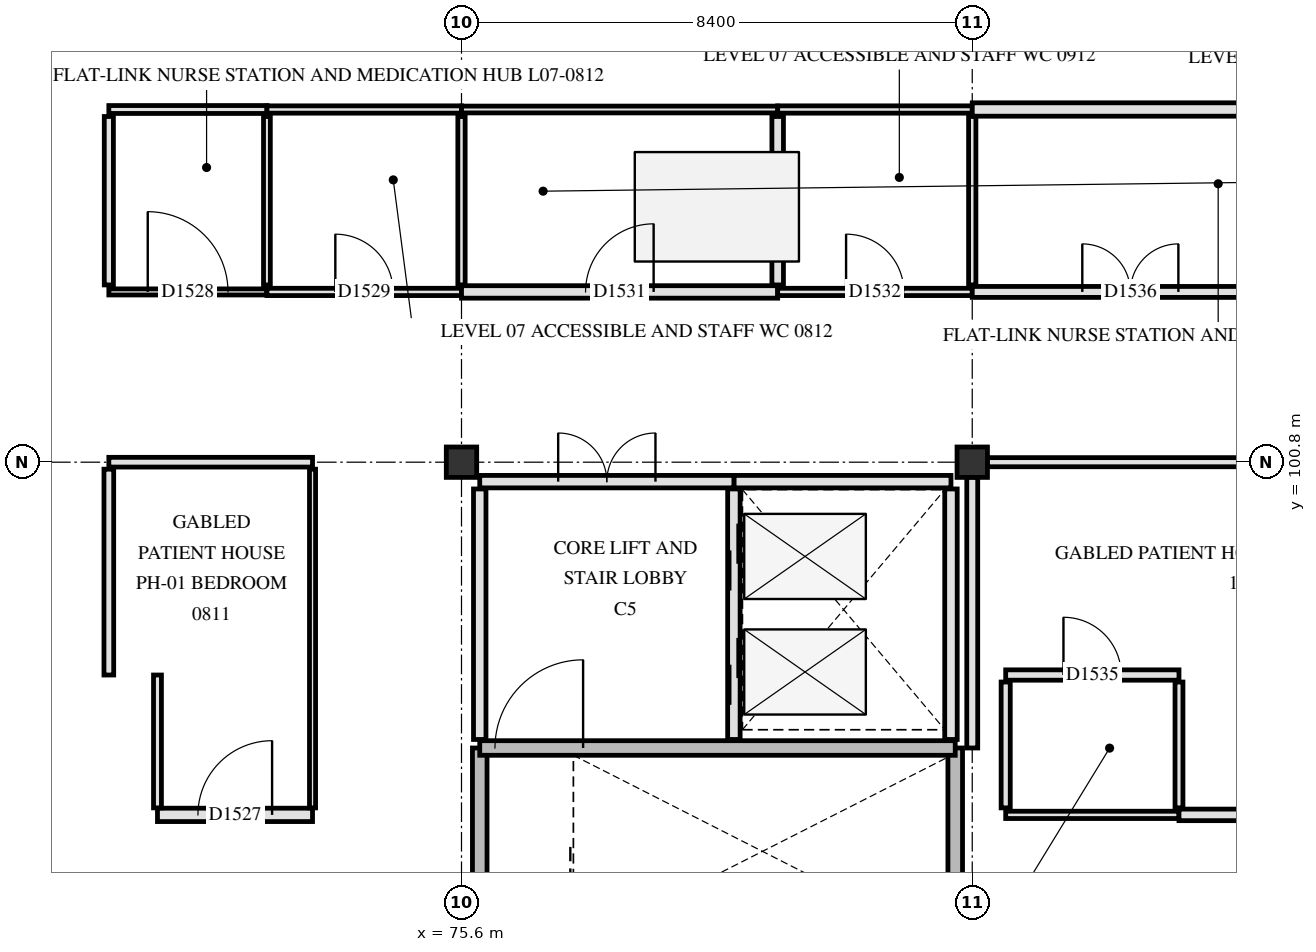
"""IFC4 building model, lengths in metres.
Left out: names, types, materials, properties, quantities, classifications, styles, units other than length and angle.
Written with IfcOpenShell. Run it as: python <this file> out.ifc"""

import sys

from ifc_helpers import new_model, si_unit, direction, frame, frame_2d, origin, origin_2d, place, context, subcontext, project, spatial, rectangle, extrude, element, fill, save


model = new_model("IFC4")
c1 = context("Model", 3, precision=1e-05, world=origin(), true_north=direction((0.0, 1.0)))
c2 = subcontext(c1, "Body", "Model", "MODEL_VIEW")
j1 = project(units=[si_unit("LENGTHUNIT", "METRE"), si_unit("PLANEANGLEUNIT", "RADIAN")], contexts=[c1])
p1 = place(None, origin())
s1 = spatial("IfcSite", under=j1, at=p1, CompositionType="ELEMENT")
p2 = place(p1, origin())
s2 = spatial("IfcBuilding", under=s1, at=p2, CompositionType="ELEMENT")
p3 = place(p2, frame((0.0, 0.0, 30.3)))
s3 = spatial("IfcBuildingStorey", under=s2, at=p3, CompositionType="ELEMENT", Elevation=30.3)
for number, where, z_axis, x_axis in (
    (1, (75.6, 100.8, 0.0), (0.0, 0.0, 1.0), (1.0, 0.0, 0.0)),
    (2, (84.0, 100.8, 0.0), (0.0, 0.0, 1.0), (1.0, 0.0, 0.0)),
):
    element("IfcColumn", number, at=place(p3, frame(where, z_axis=z_axis, x_axis=x_axis)), inside=s3, PredefinedType="COLUMN", context=c2, shape_type="SweptSolid", body=[
        extrude(rectangle(XDim=0.5, YDim=0.5, at=origin_2d()), origin(), (0.0, 0.0, 1.0), 3.9),
    ])
for number, where, z_axis, x_axis in (
    (3, (75.9, 92.78, 0.0), (0.0, 0.0, 1.0), (0.0, 1.0, 0.0)),
    (4, (83.72, 92.78, 0.0), (0.0, 0.0, 1.0), (0.0, 1.0, 0.0)),
):
    element("IfcWall", number, at=place(p3, frame(where, z_axis=z_axis, x_axis=x_axis)), inside=s3, PredefinedType="SHEAR", context=c2, shape_type="SweptSolid", body=[
        extrude(rectangle(XDim=3.32, YDim=0.24, at=frame_2d((1.66, 0.0))), origin(), (0.0, 0.0, 1.0), 3.66),
    ])
p4 = place(p3, frame((75.9, 96.1, 0.0), z_axis=(0.0, 0.0, 1.0), x_axis=(1.0, 0.0, 0.0)))
e5 = element("IfcWall", 5, at=p4, inside=s3, PredefinedType="SHEAR", context=c2, shape_type="SweptSolid", body=[
    extrude(rectangle(XDim=7.82, YDim=0.24, at=frame_2d((3.91, 0.0))), origin(), (0.0, 0.0, 1.0), 3.66),
])
p5 = place(p4, frame((0.25, 0.0, 0.0)))
e6 = element("IfcOpeningElement", 6, at=p5, cuts=e5, PredefinedType="OPENING", context=c2, shape_type="SweptSolid", body=[
    extrude(rectangle(XDim=1.45, YDim=2.2, at=frame_2d((0.725, 1.1))), frame((0.0, 0.13, 0.0), z_axis=(0.0, -1.0, 0.0), x_axis=(1.0, 0.0, 0.0)), (0.0, 0.0, 1.0), 0.26),
])
p6 = place(p3, frame((80.08, 96.24, 0.0), z_axis=(0.0, 0.0, 1.0), x_axis=(0.0, 1.0, 0.0)))
e7 = element("IfcWall", 7, at=p6, inside=s3, PredefinedType="PARTITIONING", context=c2, shape_type="SweptSolid", body=[
    extrude(rectangle(XDim=4.12, YDim=0.205, at=frame_2d((2.06, 0.0))), origin(), (0.0, 0.0, 1.0), 3.65),
])
p7 = place(p6, frame((0.57, 0.0, 0.0)))
e8 = element("IfcOpeningElement", 8, at=p7, cuts=e7, PredefinedType="OPENING", context=c2, shape_type="SweptSolid", body=[
    extrude(rectangle(XDim=1.1, YDim=2.15, at=frame_2d((0.55, 1.075))), frame((0.0, 0.113, 0.0), z_axis=(0.0, -1.0, 0.0), x_axis=(1.0, 0.0, 0.0)), (0.0, 0.0, 1.0), 0.225),
])
p8 = place(p6, frame((2.45, 0.0, 0.0)))
e9 = element("IfcOpeningElement", 9, at=p8, cuts=e7, PredefinedType="OPENING", context=c2, shape_type="SweptSolid", body=[
    extrude(rectangle(XDim=1.1, YDim=2.15, at=frame_2d((0.55, 1.075))), frame((0.0, 0.113, 0.0), z_axis=(0.0, -1.0, 0.0), x_axis=(1.0, 0.0, 0.0)), (0.0, 0.0, 1.0), 0.225),
])
p9 = place(p3, frame((83.65, 96.24, 0.0), z_axis=(0.0, 0.0, 1.0), x_axis=(0.0, 1.0, 0.0)))
e10 = element("IfcWall", 10, at=p9, inside=s3, PredefinedType="PARTITIONING", context=c2, shape_type="SweptSolid", body=[
    extrude(rectangle(XDim=4.12, YDim=0.205, at=frame_2d((2.06, 0.0))), origin(), (0.0, 0.0, 1.0), 3.65),
])
p10 = place(p3, frame((80.08, 100.48, 0.0), z_axis=(0.0, 0.0, 1.0), x_axis=(1.0, 0.0, 0.0)))
e11 = element("IfcWall", 11, at=p10, inside=s3, PredefinedType="PARTITIONING", context=c2, shape_type="SweptSolid", body=[
    extrude(rectangle(XDim=3.57, YDim=0.205, at=frame_2d((1.785, 0.0))), origin(), (0.0, 0.0, 1.0), 3.65),
])
p11 = place(p3, frame((75.9, 96.24, 0.0), z_axis=(0.0, 0.0, 1.0), x_axis=(0.0, 1.0, 0.0)))
e12 = element("IfcWall", 12, at=p11, inside=s3, PredefinedType="PARTITIONING", context=c2, shape_type="SweptSolid", body=[
    extrude(rectangle(XDim=4.12, YDim=0.205, at=frame_2d((2.06, 0.0))), origin(), (0.0, 0.0, 1.0), 3.65),
])
p12 = place(p3, frame((75.9, 100.48, 0.0), z_axis=(0.0, 0.0, 1.0), x_axis=(1.0, 0.0, 0.0)))
e13 = element("IfcWall", 13, at=p12, inside=s3, PredefinedType="PARTITIONING", context=c2, shape_type="SweptSolid", body=[
    extrude(rectangle(XDim=4.18, YDim=0.205, at=frame_2d((2.09, 0.0))), origin(), (0.0, 0.0, 1.0), 3.65),
])
p13 = place(p12, frame((1.29, 0.0, 0.0)))
e14 = element("IfcOpeningElement", 14, at=p13, cuts=e13, PredefinedType="OPENING", context=c2, shape_type="SweptSolid", body=[
    extrude(rectangle(XDim=1.6, YDim=2.25, at=frame_2d((0.8, 1.125))), frame((0.0, 0.113, 0.0), z_axis=(0.0, -1.0, 0.0), x_axis=(1.0, 0.0, 0.0)), (0.0, 0.0, 1.0), 0.225),
])
p14 = place(p3, frame((70.6, 95.0, 0.0), z_axis=(0.0, 0.0, 1.0), x_axis=(1.0, 0.0, 0.0)))
e15 = element("IfcWall", 15, at=p14, inside=s3, PredefinedType="PARTITIONING", context=c2, shape_type="SweptSolid", body=[
    extrude(rectangle(XDim=2.55, YDim=0.22, at=frame_2d((1.275, 0.0))), origin(), (0.0, 0.0, 1.0), 3.65),
])
p15 = place(p14, frame((0.665, 0.0, 0.0)))
e16 = element("IfcOpeningElement", 16, at=p15, cuts=e15, PredefinedType="OPENING", context=c2, shape_type="SweptSolid", body=[
    extrude(rectangle(XDim=1.22, YDim=2.18, at=frame_2d((0.61, 1.09))), frame((0.0, 0.12, 0.0), z_axis=(0.0, -1.0, 0.0), x_axis=(1.0, 0.0, 0.0)), (0.0, 0.0, 1.0), 0.24),
])
p16 = place(p3, frame((84.55, 95.0, 0.0), z_axis=(0.0, 0.0, 1.0), x_axis=(1.0, 0.0, 0.0)))
e17 = element("IfcWall", 17, at=p16, inside=s3, PredefinedType="PARTITIONING", context=c2, shape_type="SweptSolid", body=[
    extrude(rectangle(XDim=2.85, YDim=0.12, at=frame_2d((1.425, 0.0))), origin(), (0.0, 0.0, 1.0), 3.65),
])
p17 = place(p3, frame((87.4, 95.0, 0.0), z_axis=(0.0, 0.0, 1.0), x_axis=(1.0, 0.0, 0.0)))
e18 = element("IfcWall", 18, at=p17, inside=s3, PredefinedType="PARTITIONING", context=c2, shape_type="SweptSolid", body=[
    extrude(rectangle(XDim=5.0, YDim=0.19, at=frame_2d((2.5, 0.0))), origin(), (0.0, 0.0, 1.0), 3.25),
])
p18 = place(p17, frame((1.81, 0.0, 0.0)))
e19 = element("IfcOpeningElement", 19, at=p18, cuts=e18, PredefinedType="OPENING", context=c2, shape_type="SweptSolid", body=[
    extrude(rectangle(XDim=1.38, YDim=2.22, at=frame_2d((0.69, 1.11))), frame((0.0, 0.105, 0.0), z_axis=(0.0, -1.0, 0.0), x_axis=(1.0, 0.0, 0.0)), (0.0, 0.0, 1.0), 0.21),
])
p19 = place(p3, frame((84.55, 97.3, 0.0), z_axis=(0.0, 0.0, 1.0), x_axis=(1.0, 0.0, 0.0)))
e20 = element("IfcWall", 20, at=p19, inside=s3, PredefinedType="PARTITIONING", context=c2, shape_type="SweptSolid", body=[
    extrude(rectangle(XDim=2.85, YDim=0.17, at=frame_2d((1.425, 0.0))), origin(), (0.0, 0.0, 1.0), 3.65),
])
p20 = place(p19, frame((0.95, 0.0, 0.0)))
e21 = element("IfcOpeningElement", 21, at=p20, cuts=e20, PredefinedType="OPENING", context=c2, shape_type="SweptSolid", body=[
    extrude(rectangle(XDim=0.95, YDim=2.1, at=frame_2d((0.475, 1.05))), frame((0.0, 0.095, 0.0), z_axis=(0.0, -1.0, 0.0), x_axis=(1.0, 0.0, 0.0)), (0.0, 0.0, 1.0), 0.19),
])
p21 = place(p3, frame((69.8, 100.8, 0.0), z_axis=(0.0, 0.0, 1.0), x_axis=(1.0, 0.0, 0.0)))
e22 = element("IfcWall", 22, at=p21, inside=s3, PredefinedType="PARTITIONING", context=c2, shape_type="SweptSolid", body=[
    extrude(rectangle(XDim=3.35, YDim=0.16, at=frame_2d((1.675, 0.0))), origin(), (0.0, 0.0, 1.0), 3.25),
])
p22 = place(p3, frame((84.245, 100.8, 0.0), z_axis=(0.0, 0.0, 1.0), x_axis=(1.0, 0.0, 0.0)))
e23 = element("IfcWall", 23, at=p22, inside=s3, PredefinedType="PARTITIONING", context=c2, shape_type="SweptSolid", body=[
    extrude(rectangle(XDim=7.91, YDim=0.15, at=frame_2d((3.955, 0.0))), origin(), (0.0, 0.0, 1.0), 3.25),
])
p23 = place(p3, frame((69.8, 103.6, 0.0), z_axis=(0.0, 0.0, 1.0), x_axis=(1.0, 0.0, 0.0)))
e24 = element("IfcWall", 24, at=p23, inside=s3, PredefinedType="PARTITIONING", context=c2, shape_type="SweptSolid", body=[
    extrude(rectangle(XDim=2.6, YDim=0.1, at=frame_2d((1.3, 0.0))), origin(), (0.0, 0.0, 1.0), 3.41),
])
p24 = place(p23, frame((0.64, 0.0, 0.0)))
e25 = element("IfcOpeningElement", 25, at=p24, cuts=e24, PredefinedType="OPENING", context=c2, shape_type="SweptSolid", body=[
    extrude(rectangle(XDim=1.32, YDim=2.18, at=frame_2d((0.66, 1.09))), frame((0.0, 0.06, 0.0), z_axis=(0.0, -1.0, 0.0), x_axis=(1.0, 0.0, 0.0)), (0.0, 0.0, 1.0), 0.12),
])
p25 = place(p3, frame((72.4, 103.6, 0.0), z_axis=(0.0, 0.0, 1.0), x_axis=(1.0, 0.0, 0.0)))
e26 = element("IfcWall", 26, at=p25, inside=s3, PredefinedType="PARTITIONING", context=c2, shape_type="SweptSolid", body=[
    extrude(rectangle(XDim=3.2, YDim=0.12, at=frame_2d((1.6, 0.0))), origin(), (0.0, 0.0, 1.0), 3.25),
])
p26 = place(p25, frame((1.125, 0.0, 0.0)))
e27 = element("IfcOpeningElement", 27, at=p26, cuts=e26, PredefinedType="OPENING", context=c2, shape_type="SweptSolid", body=[
    extrude(rectangle(XDim=0.95, YDim=2.1, at=frame_2d((0.475, 1.05))), frame((0.0, 0.07, 0.0), z_axis=(0.0, -1.0, 0.0), x_axis=(1.0, 0.0, 0.0)), (0.0, 0.0, 1.0), 0.14),
])
p27 = place(p3, frame((75.6, 103.6, 0.0), z_axis=(0.0, 0.0, 1.0), x_axis=(1.0, 0.0, 0.0)))
e28 = element("IfcWall", 28, at=p27, inside=s3, PredefinedType="PARTITIONING", context=c2, shape_type="SweptSolid", body=[
    extrude(rectangle(XDim=5.2, YDim=0.205, at=frame_2d((2.6, 0.0))), origin(), (0.0, 0.0, 1.0), 3.25),
])
p28 = place(p27, frame((2.04, 0.0, 0.0)))
e29 = element("IfcOpeningElement", 29, at=p28, cuts=e28, PredefinedType="OPENING", context=c2, shape_type="SweptSolid", body=[
    extrude(rectangle(XDim=1.12, YDim=2.18, at=frame_2d((0.56, 1.09))), frame((0.0, 0.113, 0.0), z_axis=(0.0, -1.0, 0.0), x_axis=(1.0, 0.0, 0.0)), (0.0, 0.0, 1.0), 0.225),
])
p29 = place(p3, frame((80.8, 103.6, 0.0), z_axis=(0.0, 0.0, 1.0), x_axis=(1.0, 0.0, 0.0)))
e30 = element("IfcWall", 30, at=p29, inside=s3, PredefinedType="PARTITIONING", context=c2, shape_type="SweptSolid", body=[
    extrude(rectangle(XDim=3.2, YDim=0.12, at=frame_2d((1.6, 0.0))), origin(), (0.0, 0.0, 1.0), 3.25),
])
p30 = place(p29, frame((1.125, 0.0, 0.0)))
e31 = element("IfcOpeningElement", 31, at=p30, cuts=e30, PredefinedType="OPENING", context=c2, shape_type="SweptSolid", body=[
    extrude(rectangle(XDim=0.95, YDim=2.1, at=frame_2d((0.475, 1.05))), frame((0.0, 0.07, 0.0), z_axis=(0.0, -1.0, 0.0), x_axis=(1.0, 0.0, 0.0)), (0.0, 0.0, 1.0), 0.14),
])
p31 = place(p3, frame((84.0, 103.6, 0.0), z_axis=(0.0, 0.0, 1.0), x_axis=(1.0, 0.0, 0.0)))
e32 = element("IfcWall", 32, at=p31, inside=s3, PredefinedType="PARTITIONING", context=c2, shape_type="SweptSolid", body=[
    extrude(rectangle(XDim=5.2, YDim=0.18, at=frame_2d((2.6, 0.0))), origin(), (0.0, 0.0, 1.0), 3.25),
])
p32 = place(p31, frame((1.81, 0.0, 0.0)))
e33 = element("IfcOpeningElement", 33, at=p32, cuts=e32, PredefinedType="OPENING", context=c2, shape_type="SweptSolid", body=[
    extrude(rectangle(XDim=1.58, YDim=2.22, at=frame_2d((0.79, 1.11))), frame((0.0, 0.1, 0.0), z_axis=(0.0, -1.0, 0.0), x_axis=(1.0, 0.0, 0.0)), (0.0, 0.0, 1.0), 0.2),
])
p33 = place(p3, frame((69.8, 106.6, 0.0), z_axis=(0.0, 0.0, 1.0), x_axis=(1.0, 0.0, 0.0)))
e34 = element("IfcWall", 34, at=p33, inside=s3, PredefinedType="PARTITIONING", context=c2, shape_type="SweptSolid", body=[
    extrude(rectangle(XDim=2.6, YDim=0.13, at=frame_2d((1.3, 0.0))), origin(), (0.0, 0.0, 1.0), 3.65),
])
p34 = place(p3, frame((72.4, 106.6, 0.0), z_axis=(0.0, 0.0, 1.0), x_axis=(1.0, 0.0, 0.0)))
e35 = element("IfcWall", 35, at=p34, inside=s3, PredefinedType="PARTITIONING", context=c2, shape_type="SweptSolid", body=[
    extrude(rectangle(XDim=3.2, YDim=0.12, at=frame_2d((1.6, 0.0))), origin(), (0.0, 0.0, 1.0), 3.25),
])
p35 = place(p3, frame((75.6, 106.6, 0.0), z_axis=(0.0, 0.0, 1.0), x_axis=(1.0, 0.0, 0.0)))
e36 = element("IfcWall", 36, at=p35, inside=s3, PredefinedType="PARTITIONING", context=c2, shape_type="SweptSolid", body=[
    extrude(rectangle(XDim=5.2, YDim=0.112, at=frame_2d((2.6, 0.0))), origin(), (0.0, 0.0, 1.0), 3.25),
])
p36 = place(p3, frame((80.8, 106.6, 0.0), z_axis=(0.0, 0.0, 1.0), x_axis=(1.0, 0.0, 0.0)))
e37 = element("IfcWall", 37, at=p36, inside=s3, PredefinedType="PARTITIONING", context=c2, shape_type="SweptSolid", body=[
    extrude(rectangle(XDim=3.2, YDim=0.12, at=frame_2d((1.6, 0.0))), origin(), (0.0, 0.0, 1.0), 3.25),
])
p37 = place(p3, frame((84.0, 106.6, 0.0), z_axis=(0.0, 0.0, 1.0), x_axis=(1.0, 0.0, 0.0)))
e38 = element("IfcWall", 38, at=p37, inside=s3, PredefinedType="PARTITIONING", context=c2, shape_type="SweptSolid", body=[
    extrude(rectangle(XDim=5.2, YDim=0.22, at=frame_2d((2.6, 0.0))), origin(), (0.0, 0.0, 1.0), 3.25),
])
p38 = place(p3, frame((69.8, 97.3, 0.0), z_axis=(0.0, 0.0, 1.0), x_axis=(0.0, 1.0, 0.0)))
e39 = element("IfcWall", 39, at=p38, inside=s3, PredefinedType="PARTITIONING", context=c2, shape_type="SweptSolid", body=[
    extrude(rectangle(XDim=3.385, YDim=0.16, at=frame_2d((1.692, 0.0))), origin(), (0.0, 0.0, 1.0), 3.41),
])
p39 = place(p3, frame((69.8, 103.715, 0.0), z_axis=(0.0, 0.0, 1.0), x_axis=(0.0, 1.0, 0.0)))
e40 = element("IfcWall", 40, at=p39, inside=s3, PredefinedType="PARTITIONING", context=c2, shape_type="SweptSolid", body=[
    extrude(rectangle(XDim=2.77, YDim=0.15, at=frame_2d((1.385, 0.0))), origin(), (0.0, 0.0, 1.0), 3.41),
])
p40 = place(p3, frame((70.6, 95.115, 0.0), z_axis=(0.0, 0.0, 1.0), x_axis=(0.0, 1.0, 0.0)))
e41 = element("IfcWall", 41, at=p40, inside=s3, PredefinedType="PARTITIONING", context=c2, shape_type="SweptSolid", body=[
    extrude(rectangle(XDim=2.185, YDim=0.13, at=frame_2d((1.093, 0.0))), origin(), (0.0, 0.0, 1.0), 3.41),
])
p41 = place(p3, frame((72.4, 103.715, 0.0), z_axis=(0.0, 0.0, 1.0), x_axis=(0.0, 1.0, 0.0)))
e42 = element("IfcWall", 42, at=p41, inside=s3, PredefinedType="PARTITIONING", context=c2, shape_type="SweptSolid", body=[
    extrude(rectangle(XDim=2.77, YDim=0.112, at=frame_2d((1.385, 0.0))), origin(), (0.0, 0.0, 1.0), 3.41),
])
p42 = place(p3, frame((73.15, 95.115, 0.0), z_axis=(0.0, 0.0, 1.0), x_axis=(0.0, 1.0, 0.0)))
e43 = element("IfcWall", 43, at=p42, inside=s3, PredefinedType="PARTITIONING", context=c2, shape_type="SweptSolid", body=[
    extrude(rectangle(XDim=5.57, YDim=0.1, at=frame_2d((2.785, 0.0))), origin(), (0.0, 0.0, 1.0), 3.41),
])
p43 = place(p3, frame((75.6, 103.715, 0.0), z_axis=(0.0, 0.0, 1.0), x_axis=(0.0, 1.0, 0.0)))
e44 = element("IfcWall", 44, at=p43, inside=s3, PredefinedType="PARTITIONING", context=c2, shape_type="SweptSolid", body=[
    extrude(rectangle(XDim=2.77, YDim=0.12, at=frame_2d((1.385, 0.0))), origin(), (0.0, 0.0, 1.0), 3.25),
])
p44 = place(p3, frame((80.8, 103.715, 0.0), z_axis=(0.0, 0.0, 1.0), x_axis=(0.0, 1.0, 0.0)))
e45 = element("IfcWall", 45, at=p44, inside=s3, PredefinedType="PARTITIONING", context=c2, shape_type="SweptSolid", body=[
    extrude(rectangle(XDim=2.77, YDim=0.19, at=frame_2d((1.385, 0.0))), origin(), (0.0, 0.0, 1.0), 3.41),
])
p45 = place(p3, frame((84.0, 96.1, 0.0), z_axis=(0.0, 0.0, 1.0), x_axis=(0.0, 1.0, 0.0)))
e46 = element("IfcWall", 46, at=p45, inside=s3, PredefinedType="PARTITIONING", context=c2, shape_type="SweptSolid", body=[
    extrude(rectangle(XDim=4.455, YDim=0.18, at=frame_2d((2.228, 0.0))), origin(), (0.0, 0.0, 1.0), 3.25),
])
p46 = place(p3, frame((84.0, 103.715, 0.0), z_axis=(0.0, 0.0, 1.0), x_axis=(0.0, 1.0, 0.0)))
e47 = element("IfcWall", 47, at=p46, inside=s3, PredefinedType="PARTITIONING", context=c2, shape_type="SweptSolid", body=[
    extrude(rectangle(XDim=2.77, YDim=0.12, at=frame_2d((1.385, 0.0))), origin(), (0.0, 0.0, 1.0), 3.25),
])
p47 = place(p3, frame((84.55, 95.115, 0.0), z_axis=(0.0, 0.0, 1.0), x_axis=(0.0, 1.0, 0.0)))
e48 = element("IfcWall", 48, at=p47, inside=s3, PredefinedType="PARTITIONING", context=c2, shape_type="SweptSolid", body=[
    extrude(rectangle(XDim=2.07, YDim=0.15, at=frame_2d((1.035, 0.0))), origin(), (0.0, 0.0, 1.0), 3.41),
])
p48 = place(p3, frame((87.4, 95.115, 0.0), z_axis=(0.0, 0.0, 1.0), x_axis=(0.0, 1.0, 0.0)))
e49 = element("IfcWall", 49, at=p48, inside=s3, PredefinedType="PARTITIONING", context=c2, shape_type="SweptSolid", body=[
    extrude(rectangle(XDim=2.07, YDim=0.13, at=frame_2d((1.035, 0.0))), origin(), (0.0, 0.0, 1.0), 3.41),
])
p49 = place(p5, origin())
e50 = element("IfcDoor", 50, at=p49, inside=s3, OperationType="SINGLE_SWING_RIGHT", PredefinedType="DOOR", context=c2, shape_type="SweptSolid", body=[
    extrude(rectangle(XDim=1.45, YDim=2.2, at=frame_2d((0.725, 1.1))), frame((0.0, 0.025, 0.0), z_axis=(0.0, -1.0, 0.0), x_axis=(1.0, 0.0, 0.0)), (0.0, 0.0, 1.0), 0.05),
])
fill(e6, e50)
p50 = place(p7, origin())
e51 = element("IfcDoor", 51, at=p50, inside=s3, OperationType="SLIDING_TO_LEFT", PredefinedType="DOOR", context=c2, shape_type="SweptSolid", body=[
    extrude(rectangle(XDim=1.1, YDim=2.15, at=frame_2d((0.55, 1.075))), frame((0.0, 0.025, 0.0), z_axis=(0.0, -1.0, 0.0), x_axis=(1.0, 0.0, 0.0)), (0.0, 0.0, 1.0), 0.05),
])
fill(e8, e51)
p51 = place(p8, origin())
e52 = element("IfcDoor", 52, at=p51, inside=s3, OperationType="SLIDING_TO_LEFT", PredefinedType="DOOR", context=c2, shape_type="SweptSolid", body=[
    extrude(rectangle(XDim=1.1, YDim=2.15, at=frame_2d((0.55, 1.075))), frame((0.0, 0.025, 0.0), z_axis=(0.0, -1.0, 0.0), x_axis=(1.0, 0.0, 0.0)), (0.0, 0.0, 1.0), 0.05),
])
fill(e9, e52)
p52 = place(p13, origin())
e53 = element("IfcDoor", 53, at=p52, inside=s3, OperationType="DOUBLE_SWING_LEFT", PredefinedType="DOOR", context=c2, shape_type="SweptSolid", body=[
    extrude(rectangle(XDim=1.6, YDim=2.25, at=frame_2d((0.8, 1.125))), frame((0.0, 0.025, 0.0), z_axis=(0.0, -1.0, 0.0), x_axis=(1.0, 0.0, 0.0)), (0.0, 0.0, 1.0), 0.05),
])
fill(e14, e53)
p53 = place(p15, origin())
e54 = element("IfcDoor", 54, at=p53, inside=s3, OperationType="SINGLE_SWING_RIGHT", PredefinedType="DOOR", context=c2, shape_type="SweptSolid", body=[
    extrude(rectangle(XDim=1.22, YDim=2.18, at=frame_2d((0.61, 1.09))), frame((0.0, 0.025, 0.0), z_axis=(0.0, -1.0, 0.0), x_axis=(1.0, 0.0, 0.0)), (0.0, 0.0, 1.0), 0.05),
])
fill(e16, e54)
p54 = place(p24, origin())
e55 = element("IfcDoor", 55, at=p54, inside=s3, OperationType="SINGLE_SWING_LEFT", PredefinedType="DOOR", context=c2, shape_type="SweptSolid", body=[
    extrude(rectangle(XDim=1.32, YDim=2.18, at=frame_2d((0.66, 1.09))), frame((0.0, 0.025, 0.0), z_axis=(0.0, -1.0, 0.0), x_axis=(1.0, 0.0, 0.0)), (0.0, 0.0, 1.0), 0.05),
])
fill(e25, e55)
p55 = place(p26, origin())
e56 = element("IfcDoor", 56, at=p55, inside=s3, OperationType="SINGLE_SWING_LEFT", PredefinedType="DOOR", context=c2, shape_type="SweptSolid", body=[
    extrude(rectangle(XDim=0.95, YDim=2.1, at=frame_2d((0.475, 1.05))), frame((0.0, 0.025, 0.0), z_axis=(0.0, -1.0, 0.0), x_axis=(1.0, 0.0, 0.0)), (0.0, 0.0, 1.0), 0.05),
])
fill(e27, e56)
p56 = place(p28, origin())
e57 = element("IfcDoor", 57, at=p56, inside=s3, OperationType="SINGLE_SWING_RIGHT", PredefinedType="DOOR", context=c2, shape_type="SweptSolid", body=[
    extrude(rectangle(XDim=1.12, YDim=2.18, at=frame_2d((0.56, 1.09))), frame((0.0, 0.025, 0.0), z_axis=(0.0, -1.0, 0.0), x_axis=(1.0, 0.0, 0.0)), (0.0, 0.0, 1.0), 0.05),
])
fill(e29, e57)
p57 = place(p30, origin())
e58 = element("IfcDoor", 58, at=p57, inside=s3, OperationType="SINGLE_SWING_LEFT", PredefinedType="DOOR", context=c2, shape_type="SweptSolid", body=[
    extrude(rectangle(XDim=0.95, YDim=2.1, at=frame_2d((0.475, 1.05))), frame((0.0, 0.025, 0.0), z_axis=(0.0, -1.0, 0.0), x_axis=(1.0, 0.0, 0.0)), (0.0, 0.0, 1.0), 0.05),
])
fill(e31, e58)
p58 = place(p20, origin())
e59 = element("IfcDoor", 59, at=p58, inside=s3, OperationType="SINGLE_SWING_LEFT", PredefinedType="DOOR", context=c2, shape_type="SweptSolid", body=[
    extrude(rectangle(XDim=0.95, YDim=2.1, at=frame_2d((0.475, 1.05))), frame((0.0, 0.025, 0.0), z_axis=(0.0, -1.0, 0.0), x_axis=(1.0, 0.0, 0.0)), (0.0, 0.0, 1.0), 0.05),
])
fill(e21, e59)
p59 = place(p32, origin())
e60 = element("IfcDoor", 60, at=p59, inside=s3, OperationType="DOUBLE_SWING_LEFT", PredefinedType="DOOR", context=c2, shape_type="SweptSolid", body=[
    extrude(rectangle(XDim=1.58, YDim=2.22, at=frame_2d((0.79, 1.11))), frame((0.0, 0.025, 0.0), z_axis=(0.0, -1.0, 0.0), x_axis=(1.0, 0.0, 0.0)), (0.0, 0.0, 1.0), 0.05),
])
fill(e33, e60)
save(model, sys.argv[1])
